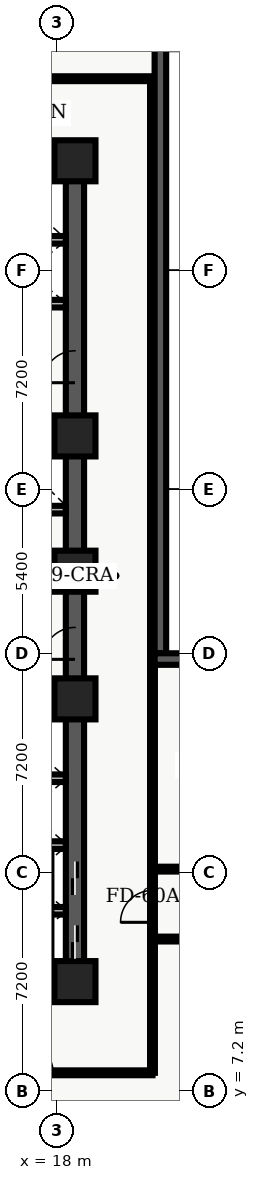
"""IFC4 building model, lengths in metres.
Left out: names, types, materials, properties, quantities, classifications, styles, units other than length and angle.
Written with IfcOpenShell. Run it as: python <this file> out.ifc"""

import sys

from ifc_helpers import new_model, entity, si_unit, converted_unit, direction, frame, origin_with_axes, origin_2d_with_axis, place, context, subcontext, project, spatial, polyline, rectangle, outline, extrude, element, fill, save


model = new_model("IFC4")
c1 = context("Model", 3, precision=1e-05, world=origin_with_axes(), true_north=direction((0.0, 1.0)))
c2 = subcontext(c1, "Body", "Model", "MODEL_VIEW")
j1 = project(units=[si_unit("LENGTHUNIT", "METRE"), converted_unit("PLANEANGLEUNIT", "DEGREE", entity("IfcPlaneAngleMeasure", 0.017), si_unit("PLANEANGLEUNIT", "RADIAN"), dimensions=[0, 0, 0, 0, 0, 0, 0])], contexts=[c1])
p1 = place(None, origin_with_axes())
s1 = spatial("IfcSite", under=j1, at=p1, CompositionType="ELEMENT")
p2 = place(p1, origin_with_axes())
s2 = spatial("IfcBuilding", under=s1, at=p2, CompositionType="ELEMENT")
p3 = place(p2, frame((0.0, 0.0, 40.5), z_axis=(0.0, 0.0, 1.0), x_axis=(1.0, 0.0, 0.0)))
s3 = spatial("IfcBuildingStorey", under=s2, at=p3, CompositionType="ELEMENT", Elevation=40.5)
p4 = place(p3, frame((11.4, 10.8, 0.0), z_axis=(0.0, 0.0, 1.0), x_axis=(1.0, 0.0, 0.0)))
e1 = element("IfcWall", 1, at=p4, inside=s3, PredefinedType="SHEAR", context=c2, shape_type="SweptSolid", body=[
    extrude(outline(polyline([(0.0, -0.3), (7.2, -0.3), (7.2, 0.3), (0.0, 0.3), (0.0, -0.3)])), origin_with_axes(), (0.0, 0.0, 1.0), 3.66),
])
p5 = place(p4, frame((2.625, 0.0, 0.0), z_axis=(0.0, 0.0, 1.0), x_axis=(1.0, 0.0, 0.0)))
e2 = element("IfcOpeningElement", 2, at=p5, cuts=e1, PredefinedType="OPENING", context=c2, shape_type="SweptSolid", body=[
    extrude(rectangle(XDim=1.05, YDim=0.62, at=origin_2d_with_axis()), origin_with_axes(), (0.0, 0.0, 1.0), 2.15),
])
p6 = place(p3, frame((11.4, 37.8, 0.0), z_axis=(0.0, 0.0, 1.0), x_axis=(1.0, 0.0, 0.0)))
e3 = element("IfcWall", 3, at=p6, inside=s3, PredefinedType="SHEAR", context=c2, shape_type="SweptSolid", body=[
    extrude(outline(polyline([(0.0, -0.3), (7.2, -0.3), (7.2, 0.3), (0.0, 0.3), (0.0, -0.3)])), origin_with_axes(), (0.0, 0.0, 1.0), 3.66),
])
p7 = place(p6, frame((2.625, 0.0, 0.0), z_axis=(0.0, 0.0, 1.0), x_axis=(1.0, 0.0, 0.0)))
e4 = element("IfcOpeningElement", 4, at=p7, cuts=e3, PredefinedType="OPENING", context=c2, shape_type="SweptSolid", body=[
    extrude(rectangle(XDim=1.05, YDim=0.62, at=origin_2d_with_axis()), origin_with_axes(), (0.0, 0.0, 1.0), 2.15),
])
p8 = place(p3, frame((18.6, 10.8, 0.0), z_axis=(0.0, 0.0, 1.0), x_axis=(0.0, 1.0, 0.0)))
e5 = element("IfcWall", 5, at=p8, inside=s3, PredefinedType="SHEAR", context=c2, shape_type="SweptSolid", body=[
    extrude(outline(polyline([(0.0, -0.3), (13.5, -0.3), (13.5, 0.3), (0.0, 0.3), (0.0, -0.3)])), origin_with_axes(), (0.0, 0.0, 1.0), 3.66),
])
p9 = place(p8, frame((1.3, 0.0, 0.0), z_axis=(0.0, 0.0, 1.0), x_axis=(1.0, 0.0, 0.0)))
e6 = element("IfcOpeningElement", 6, at=p9, cuts=e5, PredefinedType="OPENING", context=c2, shape_type="SweptSolid", body=[
    extrude(rectangle(XDim=1.1, YDim=0.62, at=origin_2d_with_axis()), origin_with_axes(), (0.0, 0.0, 1.0), 2.15),
])
p10 = place(p8, frame((3.4, 0.0, 0.0), z_axis=(0.0, 0.0, 1.0), x_axis=(1.0, 0.0, 0.0)))
e7 = element("IfcOpeningElement", 7, at=p10, cuts=e5, PredefinedType="OPENING", context=c2, shape_type="SweptSolid", body=[
    extrude(rectangle(XDim=1.1, YDim=0.62, at=origin_2d_with_axis()), origin_with_axes(), (0.0, 0.0, 1.0), 2.15),
])
p11 = place(p8, frame((11.125, 0.0, 0.0), z_axis=(0.0, 0.0, 1.0), x_axis=(1.0, 0.0, 0.0)))
e8 = element("IfcOpeningElement", 8, at=p11, cuts=e5, PredefinedType="OPENING", context=c2, shape_type="SweptSolid", body=[
    extrude(rectangle(XDim=1.05, YDim=0.62, at=origin_2d_with_axis()), origin_with_axes(), (0.0, 0.0, 1.0), 2.15),
])
p12 = place(p3, frame((18.6, 24.3, 0.0), z_axis=(0.0, 0.0, 1.0), x_axis=(0.0, 1.0, 0.0)))
e9 = element("IfcWall", 9, at=p12, inside=s3, PredefinedType="SHEAR", context=c2, shape_type="SweptSolid", body=[
    extrude(outline(polyline([(0.0, -0.3), (13.5, -0.3), (13.5, 0.3), (0.0, 0.3), (0.0, -0.3)])), origin_with_axes(), (0.0, 0.0, 1.0), 3.66),
])
p13 = place(p12, frame((6.725, 0.0, 0.0), z_axis=(0.0, 0.0, 1.0), x_axis=(1.0, 0.0, 0.0)))
e10 = element("IfcOpeningElement", 10, at=p13, cuts=e9, PredefinedType="OPENING", context=c2, shape_type="SweptSolid", body=[
    extrude(rectangle(XDim=1.05, YDim=0.62, at=origin_2d_with_axis()), origin_with_axes(), (0.0, 0.0, 1.0), 2.15),
])
for number, where, z_axis, x_axis in (
    (11, (11.7, 19.825, 0.0), (0.0, 0.0, 1.0), (1.0, 0.0, 0.0)),
    (12, (11.7, 28.775, 0.0), (0.0, 0.0, 1.0), (1.0, 0.0, 0.0)),
):
    element("IfcWall", number, at=place(p3, frame(where, z_axis=z_axis, x_axis=x_axis)), inside=s3, PredefinedType="SHEAR", context=c2, shape_type="SweptSolid", body=[
        extrude(outline(polyline([(0.0, -0.125), (6.6, -0.125), (6.6, 0.125), (0.0, 0.125), (0.0, -0.125)])), origin_with_axes(), (0.0, 0.0, 1.0), 3.66),
    ])
p14 = place(p3, frame((11.7, 24.1, 0.0), z_axis=(0.0, 0.0, 1.0), x_axis=(1.0, 0.0, 0.0)))
e13 = element("IfcWall", 13, at=p14, inside=s3, PredefinedType="SOLIDWALL", context=c2, shape_type="SweptSolid", body=[
    extrude(outline(polyline([(0.0, -0.125), (6.6, -0.125), (6.6, 0.125), (0.0, 0.125), (0.0, -0.125)])), origin_with_axes(), (0.0, 0.0, 1.0), 2.7),
])
p15 = place(p14, frame((3.75, 0.0, 0.0), z_axis=(0.0, 0.0, 1.0), x_axis=(1.0, 0.0, 0.0)))
e14 = element("IfcOpeningElement", 14, at=p15, cuts=e13, PredefinedType="OPENING", context=c2, shape_type="SweptSolid", body=[
    extrude(rectangle(XDim=0.9, YDim=0.27, at=origin_2d_with_axis()), origin_with_axes(), (0.0, 0.0, 1.0), 2.15),
])
p16 = place(p3, frame((11.7, 26.325, 0.0), z_axis=(0.0, 0.0, 1.0), x_axis=(1.0, 0.0, 0.0)))
e15 = element("IfcWall", 15, at=p16, inside=s3, PredefinedType="SOLIDWALL", context=c2, shape_type="SweptSolid", body=[
    extrude(outline(polyline([(0.0, -0.125), (6.6, -0.125), (6.6, 0.125), (0.0, 0.125), (0.0, -0.125)])), origin_with_axes(), (0.0, 0.0, 1.0), 2.7),
])
p17 = place(p16, frame((3.5, 0.0, 0.0), z_axis=(0.0, 0.0, 1.0), x_axis=(1.0, 0.0, 0.0)))
e16 = element("IfcOpeningElement", 16, at=p17, cuts=e15, PredefinedType="OPENING", context=c2, shape_type="SweptSolid", body=[
    extrude(rectangle(XDim=0.9, YDim=0.27, at=origin_2d_with_axis()), origin_with_axes(), (0.0, 0.0, 1.0), 2.15),
])
for number, where, z_axis, x_axis in (
    (17, (18.6, 10.8, 0.0), (0.0, 0.0, 1.0), (1.0, 0.0, 0.0)),
    (18, (18.6, 20.1, 0.0), (0.0, 0.0, 1.0), (1.0, 0.0, 0.0)),
    (19, (18.6, 24.3, 0.0), (0.0, 0.0, 1.0), (1.0, 0.0, 0.0)),
    (20, (18.6, 28.75, 0.0), (0.0, 0.0, 1.0), (1.0, 0.0, 0.0)),
    (21, (18.6, 37.8, 0.0), (0.0, 0.0, 1.0), (1.0, 0.0, 0.0)),
):
    element("IfcColumn", number, at=place(p3, frame(where, z_axis=z_axis, x_axis=x_axis)), inside=s3, PredefinedType="COLUMN", context=c2, shape_type="SweptSolid", body=[
        extrude(rectangle(XDim=1.35, YDim=1.35, at=origin_2d_with_axis()), origin_with_axes(), (0.0, 0.0, 1.0), 3.9),
    ])
for number, where, z_axis, x_axis in (
    (22, (15.84, 13.13, 0.0), (0.0, 0.0, 1.0), (1.0, 0.0, 0.0)),
    (23, (15.84, 15.29, 0.0), (0.0, 0.0, 1.0), (1.0, 0.0, 0.0)),
    (24, (15.84, 17.49, 0.0), (0.0, 0.0, 1.0), (1.0, 0.0, 0.0)),
    (25, (15.84, 33.1, 0.0), (0.0, 0.0, 1.0), (1.0, 0.0, 0.0)),
    (26, (15.84, 35.2, 0.0), (0.0, 0.0, 1.0), (1.0, 0.0, 0.0)),
):
    element("IfcWall", number, at=place(p3, frame(where, z_axis=z_axis, x_axis=x_axis)), inside=s3, PredefinedType="SOLIDWALL", context=c2, shape_type="SweptSolid", body=[
        extrude(outline(polyline([(0.0, -0.125), (2.46, -0.125), (2.46, 0.125), (0.0, 0.125), (0.0, -0.125)])), origin_with_axes(), (0.0, 0.0, 1.0), 2.7),
    ])
p18 = place(p3, frame((2.6, 7.8, 0.0), z_axis=(0.0, 0.0, 1.0), x_axis=(1.0, 0.0, 0.0)))
e27 = element("IfcWall", 27, at=p18, inside=s3, PredefinedType="PARTITIONING", context=c2, shape_type="SweptSolid", body=[
    extrude(outline(polyline([(0.0, -0.08), (18.55, -0.08), (18.55, 0.08), (0.0, 0.08), (0.0, -0.08)])), origin_with_axes(), (0.0, 0.0, 1.0), 2.7),
])
p19 = place(p18, frame((2.225, 0.0, 0.0), z_axis=(0.0, 0.0, 1.0), x_axis=(1.0, 0.0, 0.0)))
e28 = element("IfcOpeningElement", 28, at=p19, cuts=e27, PredefinedType="OPENING", context=c2, shape_type="SweptSolid", body=[
    extrude(rectangle(XDim=1.0, YDim=0.18, at=origin_2d_with_axis()), origin_with_axes(), (0.0, 0.0, 1.0), 2.15),
])
p20 = place(p18, frame((8.043, 0.0, 0.0), z_axis=(0.0, 0.0, 1.0), x_axis=(1.0, 0.0, 0.0)))
e29 = element("IfcOpeningElement", 29, at=p20, cuts=e27, PredefinedType="OPENING", context=c2, shape_type="SweptSolid", body=[
    extrude(rectangle(XDim=1.0, YDim=0.18, at=origin_2d_with_axis()), origin_with_axes(), (0.0, 0.0, 1.0), 2.15),
])
p21 = place(p18, frame((14.784, 0.0, 0.0), z_axis=(0.0, 0.0, 1.0), x_axis=(1.0, 0.0, 0.0)))
e30 = element("IfcOpeningElement", 30, at=p21, cuts=e27, PredefinedType="OPENING", context=c2, shape_type="SweptSolid", body=[
    extrude(rectangle(XDim=1.0, YDim=0.18, at=origin_2d_with_axis()), origin_with_axes(), (0.0, 0.0, 1.0), 2.15),
])
p22 = place(p3, frame((2.6, 40.5, 0.0), z_axis=(0.0, 0.0, 1.0), x_axis=(1.0, 0.0, 0.0)))
e31 = element("IfcWall", 31, at=p22, inside=s3, PredefinedType="PARTITIONING", context=c2, shape_type="SweptSolid", body=[
    extrude(outline(polyline([(0.0, -0.08), (18.65, -0.08), (18.65, 0.08), (0.0, 0.08), (0.0, -0.08)])), origin_with_axes(), (0.0, 0.0, 1.0), 2.7),
])
p23 = place(p22, frame((5.275, 0.0, 0.0), z_axis=(0.0, 0.0, 1.0), x_axis=(1.0, 0.0, 0.0)))
e32 = element("IfcOpeningElement", 32, at=p23, cuts=e31, PredefinedType="OPENING", context=c2, shape_type="SweptSolid", body=[
    extrude(rectangle(XDim=1.0, YDim=0.18, at=origin_2d_with_axis()), origin_with_axes(), (0.0, 0.0, 1.0), 2.15),
])
p24 = place(p22, frame((12.61, 0.0, 0.0), z_axis=(0.0, 0.0, 1.0), x_axis=(1.0, 0.0, 0.0)))
e33 = element("IfcOpeningElement", 33, at=p24, cuts=e31, PredefinedType="OPENING", context=c2, shape_type="SweptSolid", body=[
    extrude(rectangle(XDim=1.2, YDim=0.18, at=origin_2d_with_axis()), origin_with_axes(), (0.0, 0.0, 1.0), 2.2),
])
p25 = place(p3, frame((21.15, 7.8, 0.0), z_axis=(0.0, 0.0, 1.0), x_axis=(0.0, 1.0, 0.0)))
e34 = element("IfcWall", 34, at=p25, inside=s3, PredefinedType="PARTITIONING", context=c2, shape_type="SweptSolid", body=[
    extrude(outline(polyline([(0.0, -0.08), (32.7, -0.08), (32.7, 0.08), (0.0, 0.08), (0.0, -0.08)])), origin_with_axes(), (0.0, 0.0, 1.0), 2.7),
])
p26 = place(p25, frame((5.475, 0.0, 0.0), z_axis=(0.0, 0.0, 1.0), x_axis=(1.0, 0.0, 0.0)))
e35 = element("IfcOpeningElement", 35, at=p26, cuts=e34, PredefinedType="OPENING", context=c2, shape_type="SweptSolid", body=[
    extrude(rectangle(XDim=1.05, YDim=0.18, at=origin_2d_with_axis()), origin_with_axes(), (0.0, 0.0, 1.0), 2.15),
])
p27 = place(p3, frame((21.15, 12.2, 0.0), z_axis=(0.0, 0.0, 1.0), x_axis=(1.0, 0.0, 0.0)))
e36 = element("IfcWall", 36, at=p27, inside=s3, PredefinedType="PARTITIONING", context=c2, shape_type="SweptSolid", body=[
    extrude(outline(polyline([(0.0, -0.08), (15.2, -0.08), (15.2, 0.08), (0.0, 0.08), (0.0, -0.08)])), origin_with_axes(), (0.0, 0.0, 1.0), 2.7),
])
p28 = place(p27, frame((3.477, 0.0, 0.0), z_axis=(0.0, 0.0, 1.0), x_axis=(1.0, 0.0, 0.0)))
e37 = element("IfcOpeningElement", 37, at=p28, cuts=e36, PredefinedType="OPENING", context=c2, shape_type="SweptSolid", body=[
    extrude(rectangle(XDim=1.0, YDim=0.18, at=origin_2d_with_axis()), origin_with_axes(), (0.0, 0.0, 1.0), 2.15),
])
p29 = place(p27, frame((10.947, 0.0, 0.0), z_axis=(0.0, 0.0, 1.0), x_axis=(1.0, 0.0, 0.0)))
e38 = element("IfcOpeningElement", 38, at=p29, cuts=e36, PredefinedType="OPENING", context=c2, shape_type="SweptSolid", body=[
    extrude(rectangle(XDim=1.0, YDim=0.18, at=origin_2d_with_axis()), origin_with_axes(), (0.0, 0.0, 1.0), 2.15),
])
p30 = place(p3, frame((21.15, 14.5, 0.0), z_axis=(0.0, 0.0, 1.0), x_axis=(1.0, 0.0, 0.0)))
e39 = element("IfcWall", 39, at=p30, inside=s3, PredefinedType="PARTITIONING", context=c2, shape_type="SweptSolid", body=[
    extrude(outline(polyline([(0.0, -0.08), (15.2, -0.08), (15.2, 0.08), (0.0, 0.08), (0.0, -0.08)])), origin_with_axes(), (0.0, 0.0, 1.0), 2.7),
])
p31 = place(p30, frame((2.303, 0.0, 0.0), z_axis=(0.0, 0.0, 1.0), x_axis=(1.0, 0.0, 0.0)))
e40 = element("IfcOpeningElement", 40, at=p31, cuts=e39, PredefinedType="OPENING", context=c2, shape_type="SweptSolid", body=[
    extrude(rectangle(XDim=1.0, YDim=0.18, at=origin_2d_with_axis()), origin_with_axes(), (0.0, 0.0, 1.0), 2.15),
])
p32 = place(p30, frame((6.851, 0.0, 0.0), z_axis=(0.0, 0.0, 1.0), x_axis=(1.0, 0.0, 0.0)))
e41 = element("IfcOpeningElement", 41, at=p32, cuts=e39, PredefinedType="OPENING", context=c2, shape_type="SweptSolid", body=[
    extrude(rectangle(XDim=1.2, YDim=0.18, at=origin_2d_with_axis()), origin_with_axes(), (0.0, 0.0, 1.0), 2.2),
])
p33 = place(p30, frame((12.198, 0.0, 0.0), z_axis=(0.0, 0.0, 1.0), x_axis=(1.0, 0.0, 0.0)))
e42 = element("IfcOpeningElement", 42, at=p33, cuts=e39, PredefinedType="OPENING", context=c2, shape_type="SweptSolid", body=[
    extrude(rectangle(XDim=1.0, YDim=0.18, at=origin_2d_with_axis()), origin_with_axes(), (0.0, 0.0, 1.0), 2.15),
])
p34 = place(p3, frame((21.41, 45.82, 0.0), z_axis=(0.0, 0.0, 1.0), x_axis=(0.0, -1.0, 0.0)))
e43 = element("IfcWall", 43, at=p34, inside=s3, PredefinedType="SOLIDWALL", context=c2, shape_type="SweptSolid", body=[
    extrude(outline(polyline([(0.0, -0.19), (24.22, -0.19), (24.22, 0.19), (0.0, 0.19), (0.0, -0.19)])), origin_with_axes(), (0.0, 0.0, 1.0), 3.66),
])
p35 = place(p34, frame((2.902, 0.0, 0.45), z_axis=(0.0, 0.0, 1.0), x_axis=(1.0, 0.0, 0.0)))
e44 = element("IfcOpeningElement", 44, at=p35, cuts=e43, PredefinedType="OPENING", context=c2, shape_type="SweptSolid", body=[
    extrude(rectangle(XDim=2.1, YDim=0.4, at=origin_2d_with_axis()), origin_with_axes(), (0.0, 0.0, 1.0), 2.2),
])
p36 = place(p3, frame((21.22, 21.41, 0.0), z_axis=(0.0, 0.0, 1.0), x_axis=(1.0, 0.0, 0.0)))
e45 = element("IfcWall", 45, at=p36, inside=s3, PredefinedType="SOLIDWALL", context=c2, shape_type="SweptSolid", body=[
    extrude(outline(polyline([(0.0, -0.19), (17.18, -0.19), (17.18, 0.19), (0.0, 0.19), (0.0, -0.19)])), origin_with_axes(), (0.0, 0.0, 1.0), 3.66),
])
p37 = place(p36, frame((2.413, 0.0, 0.45), z_axis=(0.0, 0.0, 1.0), x_axis=(1.0, 0.0, 0.0)))
e46 = element("IfcOpeningElement", 46, at=p37, cuts=e45, PredefinedType="OPENING", context=c2, shape_type="SweptSolid", body=[
    extrude(rectangle(XDim=2.1, YDim=0.4, at=origin_2d_with_axis()), origin_with_axes(), (0.0, 0.0, 1.0), 2.2),
])
p38 = place(p36, frame((13.467, 0.0, 0.45), z_axis=(0.0, 0.0, 1.0), x_axis=(1.0, 0.0, 0.0)))
e47 = element("IfcOpeningElement", 47, at=p38, cuts=e45, PredefinedType="OPENING", context=c2, shape_type="SweptSolid", body=[
    extrude(rectangle(XDim=2.1, YDim=0.4, at=origin_2d_with_axis()), origin_with_axes(), (0.0, 0.0, 1.0), 2.2),
])
p39 = place(p8, frame((1.3, 0.0, 0.0), z_axis=(0.0, 0.0, 1.0), x_axis=(1.0, 0.0, 0.0)))
e48 = element("IfcDoor", 48, at=p39, inside=s3, OperationType="SLIDING_TO_LEFT", PredefinedType="DOOR", context=c2, shape_type="SweptSolid", body=[
    extrude(rectangle(XDim=1.1, YDim=0.09, at=origin_2d_with_axis()), origin_with_axes(), (0.0, 0.0, 1.0), 2.15),
])
fill(e6, e48)
p40 = place(p8, frame((3.4, 0.0, 0.0), z_axis=(0.0, 0.0, 1.0), x_axis=(1.0, 0.0, 0.0)))
e49 = element("IfcDoor", 49, at=p40, inside=s3, OperationType="SLIDING_TO_RIGHT", PredefinedType="DOOR", context=c2, shape_type="SweptSolid", body=[
    extrude(rectangle(XDim=1.1, YDim=0.09, at=origin_2d_with_axis()), origin_with_axes(), (0.0, 0.0, 1.0), 2.15),
])
fill(e7, e49)
p41 = place(p8, frame((11.125, 0.0, 0.0), z_axis=(0.0, 0.0, 1.0), x_axis=(1.0, 0.0, 0.0)))
e50 = element("IfcDoor", 50, at=p41, inside=s3, OperationType="SINGLE_SWING_LEFT", PredefinedType="DOOR", context=c2, shape_type="SweptSolid", body=[
    extrude(rectangle(XDim=1.05, YDim=0.09, at=origin_2d_with_axis()), origin_with_axes(), (0.0, 0.0, 1.0), 2.15),
])
fill(e8, e50)
p42 = place(p12, frame((6.725, 0.0, 0.0), z_axis=(0.0, 0.0, 1.0), x_axis=(1.0, 0.0, 0.0)))
e51 = element("IfcDoor", 51, at=p42, inside=s3, OperationType="SINGLE_SWING_LEFT", PredefinedType="DOOR", context=c2, shape_type="SweptSolid", body=[
    extrude(rectangle(XDim=1.05, YDim=0.09, at=origin_2d_with_axis()), origin_with_axes(), (0.0, 0.0, 1.0), 2.15),
])
fill(e10, e51)
p43 = place(p18, frame((14.784, 0.0, 0.0), z_axis=(0.0, 0.0, 1.0), x_axis=(1.0, 0.0, 0.0)))
e52 = element("IfcDoor", 52, at=p43, inside=s3, OperationType="SINGLE_SWING_LEFT", PredefinedType="DOOR", context=c2, shape_type="SweptSolid", body=[
    extrude(rectangle(XDim=1.0, YDim=0.09, at=origin_2d_with_axis()), origin_with_axes(), (0.0, 0.0, 1.0), 2.15),
])
fill(e30, e52)
p44 = place(p25, frame((5.475, 0.0, 0.0), z_axis=(0.0, 0.0, 1.0), x_axis=(1.0, 0.0, 0.0)))
e53 = element("IfcDoor", 53, at=p44, inside=s3, OperationType="SINGLE_SWING_LEFT", PredefinedType="DOOR", context=c2, shape_type="SweptSolid", body=[
    extrude(rectangle(XDim=1.05, YDim=0.09, at=origin_2d_with_axis()), origin_with_axes(), (0.0, 0.0, 1.0), 2.15),
])
fill(e35, e53)
save(model, sys.argv[1])
